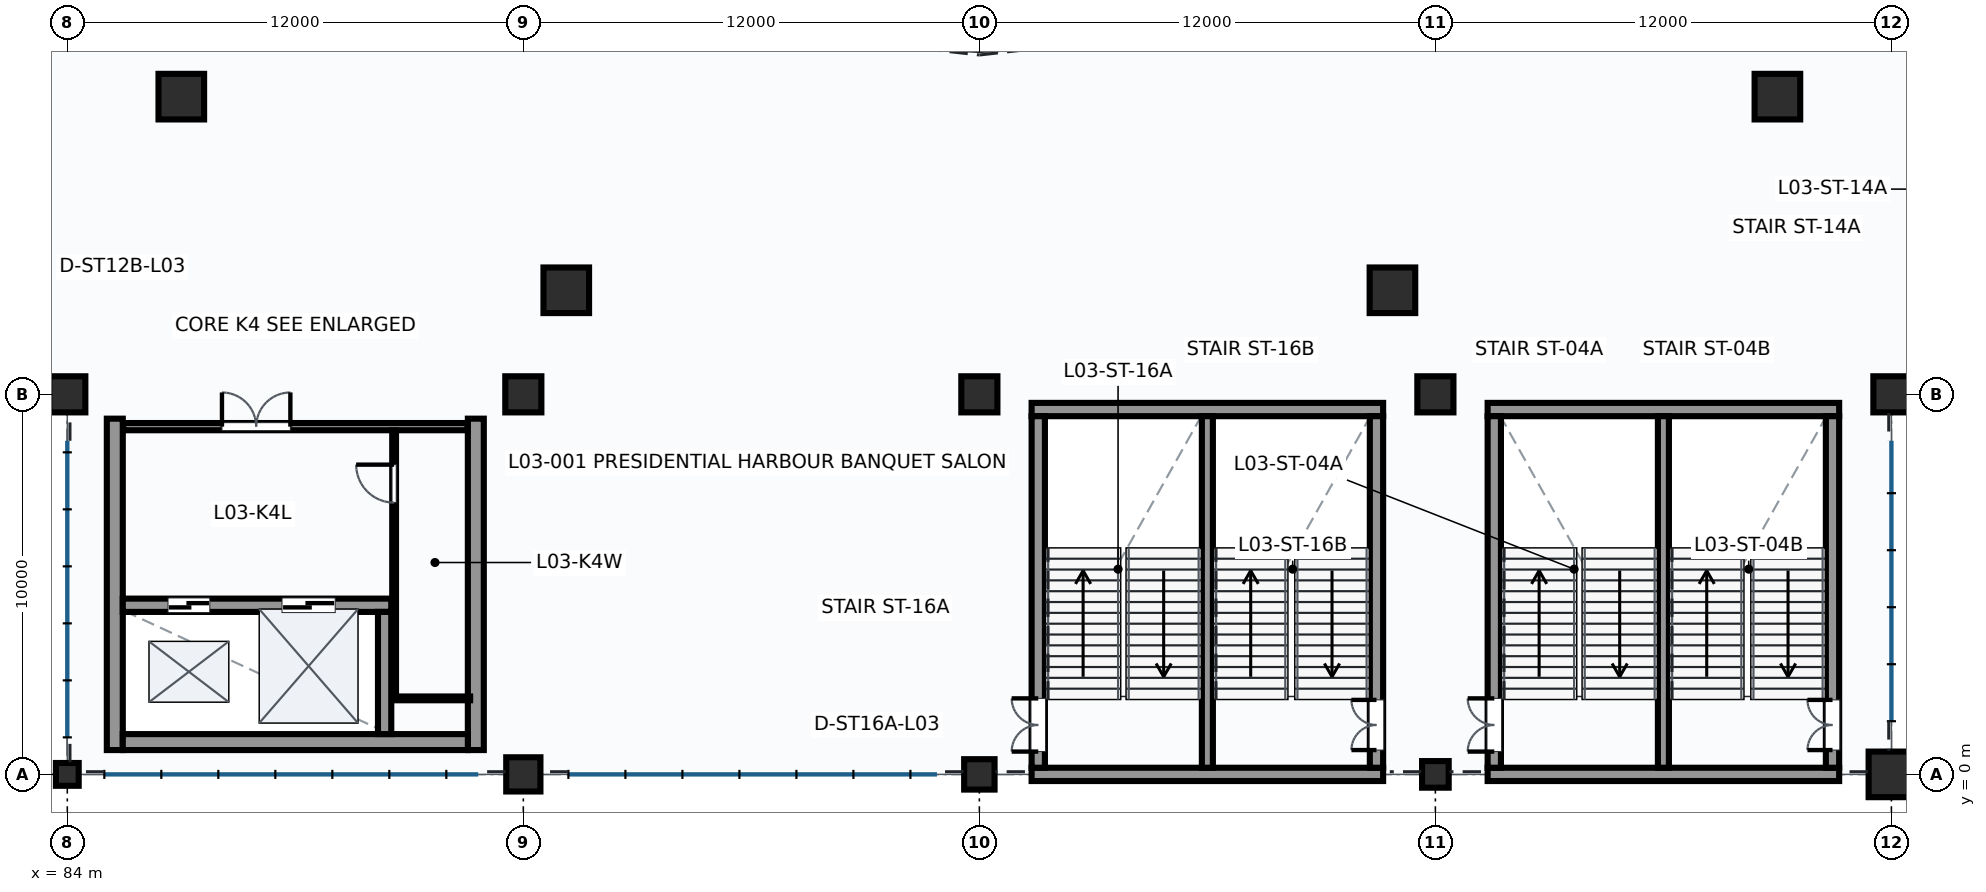
"""IFC4 building model, lengths in metres.
Left out: names, types, materials, properties, quantities, classifications, styles, units other than length and angle.
Written with IfcOpenShell. Run it as: python <this file> out.ifc"""

import sys

from ifc_helpers import new_model, si_unit, direction, frame, frame_2d, origin, origin_2d, place, context, subcontext, project, spatial, rectangle, circle, extrude, element, fill, save


model = new_model("IFC4")
c1 = context("Model", 3, precision=1e-05, world=origin(), true_north=direction((0.0, 1.0)))
c2 = subcontext(c1, "Body", "Model", "MODEL_VIEW")
j1 = project(units=[si_unit("LENGTHUNIT", "METRE"), si_unit("PLANEANGLEUNIT", "RADIAN")], contexts=[c1])
p1 = place(None, origin())
s1 = spatial("IfcSite", under=j1, at=p1, CompositionType="ELEMENT")
p2 = place(p1, origin())
s2 = spatial("IfcBuilding", under=s1, at=p2, CompositionType="ELEMENT")
p3 = place(p2, frame((0.0, 0.0, 14.7)))
s3 = spatial("IfcBuildingStorey", under=s2, at=p3, CompositionType="ELEMENT", Elevation=14.7)
p4 = place(p3, frame((84.0, 0.0, 0.0), z_axis=(0.0, 0.0, 1.0), x_axis=(1.0, 0.0, 0.0)))
e1 = element("IfcColumn", 1, at=p4, inside=s3, PredefinedType="COLUMN", context=c2, shape_type="SweptSolid", body=[
    extrude(rectangle(XDim=0.6, YDim=0.6, at=origin_2d()), origin(), (0.0, 0.0, 1.0), 4.5),
])
p5 = place(p3, frame((84.0, 10.0, 0.0), z_axis=(0.0, 0.0, 1.0), x_axis=(1.0, 0.0, 0.0)))
e2 = element("IfcColumn", 2, at=p5, inside=s3, PredefinedType="COLUMN", context=c2, shape_type="SweptSolid", body=[
    extrude(rectangle(XDim=0.95, YDim=0.95, at=origin_2d()), origin(), (0.0, 0.0, 1.0), 4.5),
])
p6 = place(p3, frame((96.0, 0.0, 0.0), z_axis=(0.0, 0.0, 1.0), x_axis=(1.0, 0.0, 0.0)))
e3 = element("IfcColumn", 3, at=p6, inside=s3, PredefinedType="COLUMN", context=c2, shape_type="SweptSolid", body=[
    extrude(circle(Radius=0.45, at=origin_2d()), origin(), (0.0, 0.0, 1.0), 4.5),
])
p7 = place(p3, frame((96.0, 10.0, 0.0), z_axis=(0.0, 0.0, 1.0), x_axis=(1.0, 0.0, 0.0)))
e4 = element("IfcColumn", 4, at=p7, inside=s3, PredefinedType="COLUMN", context=c2, shape_type="SweptSolid", body=[
    extrude(rectangle(XDim=0.95, YDim=0.95, at=origin_2d()), origin(), (0.0, 0.0, 1.0), 4.5),
])
p8 = place(p3, frame((108.0, 0.0, 0.0), z_axis=(0.0, 0.0, 1.0), x_axis=(1.0, 0.0, 0.0)))
e5 = element("IfcColumn", 5, at=p8, inside=s3, PredefinedType="COLUMN", context=c2, shape_type="SweptSolid", body=[
    extrude(circle(Radius=0.4, at=origin_2d()), origin(), (0.0, 0.0, 1.0), 4.5),
])
p9 = place(p3, frame((108.0, 10.0, 0.0), z_axis=(0.0, 0.0, 1.0), x_axis=(1.0, 0.0, 0.0)))
e6 = element("IfcColumn", 6, at=p9, inside=s3, PredefinedType="COLUMN", context=c2, shape_type="SweptSolid", body=[
    extrude(rectangle(XDim=0.95, YDim=0.95, at=origin_2d()), origin(), (0.0, 0.0, 1.0), 4.5),
])
p10 = place(p3, frame((120.0, 0.0, 0.0), z_axis=(0.0, 0.0, 1.0), x_axis=(1.0, 0.0, 0.0)))
e7 = element("IfcColumn", 7, at=p10, inside=s3, PredefinedType="COLUMN", context=c2, shape_type="SweptSolid", body=[
    extrude(circle(Radius=0.35, at=origin_2d()), origin(), (0.0, 0.0, 1.0), 4.5),
])
p11 = place(p3, frame((120.0, 10.0, 0.0), z_axis=(0.0, 0.0, 1.0), x_axis=(1.0, 0.0, 0.0)))
e8 = element("IfcColumn", 8, at=p11, inside=s3, PredefinedType="COLUMN", context=c2, shape_type="SweptSolid", body=[
    extrude(rectangle(XDim=0.95, YDim=0.95, at=origin_2d()), origin(), (0.0, 0.0, 1.0), 4.5),
])
p12 = place(p3, frame((132.0, 0.0, 0.0), z_axis=(0.0, 0.0, 1.0), x_axis=(1.0, 0.0, 0.0)))
e9 = element("IfcColumn", 9, at=p12, inside=s3, PredefinedType="COLUMN", context=c2, shape_type="SweptSolid", body=[
    extrude(rectangle(XDim=1.2, YDim=1.2, at=origin_2d()), origin(), (0.0, 0.0, 1.0), 4.5),
])
p13 = place(p3, frame((132.0, 10.0, 0.0), z_axis=(0.0, 0.0, 1.0), x_axis=(1.0, 0.0, 0.0)))
e10 = element("IfcColumn", 10, at=p13, inside=s3, PredefinedType="COLUMN", context=c2, shape_type="SweptSolid", body=[
    extrude(rectangle(XDim=0.95, YDim=0.95, at=origin_2d()), origin(), (0.0, 0.0, 1.0), 4.5),
])
for number, where, z_axis, x_axis in (
    (11, (87.0, 17.833, 0.0), (0.0, 0.0, 1.0), (1.0, 0.0, 0.0)),
    (12, (97.13, 12.738, 0.0), (0.0, 0.0, 1.0), (1.0, 0.0, 0.0)),
    (13, (118.87, 12.738, 0.0), (0.0, 0.0, 1.0), (1.0, 0.0, 0.0)),
    (14, (129.0, 17.833, 0.0), (0.0, 0.0, 1.0), (1.0, 0.0, 0.0)),
):
    element("IfcColumn", number, at=place(p3, frame(where, z_axis=z_axis, x_axis=x_axis)), inside=s3, PredefinedType="COLUMN", context=c2, shape_type="SweptSolid", body=[
        extrude(rectangle(XDim=1.2, YDim=1.2, at=origin_2d()), origin(), (0.0, 0.0, 1.0), 4.5),
    ])
p14 = place(p3, frame((121.375, 0.0, 0.0), z_axis=(0.0, 0.0, 1.0), x_axis=(1.0, 0.0, 0.0)))
e15 = element("IfcWall", 15, at=p14, inside=s3, PredefinedType="SHEAR", context=c2, shape_type="SweptSolid", body=[
    extrude(rectangle(XDim=9.25, YDim=0.35, at=frame_2d((4.625, 0.0))), origin(), (0.0, 0.0, 1.0), 3.596),
])
p15 = place(p3, frame((121.375, 9.6, 0.0), z_axis=(0.0, 0.0, 1.0), x_axis=(1.0, 0.0, 0.0)))
e16 = element("IfcWall", 16, at=p15, inside=s3, PredefinedType="SHEAR", context=c2, shape_type="SweptSolid", body=[
    extrude(rectangle(XDim=9.25, YDim=0.35, at=frame_2d((4.625, 0.0))), origin(), (0.0, 0.0, 1.0), 4.5),
])
p16 = place(p3, frame((121.55, 0.175, 0.0), z_axis=(0.0, 0.0, 1.0), x_axis=(0.0, 1.0, 0.0)))
e17 = element("IfcWall", 17, at=p16, inside=s3, PredefinedType="SHEAR", context=c2, shape_type="SweptSolid", body=[
    extrude(rectangle(XDim=9.25, YDim=0.35, at=frame_2d((4.625, 0.0))), origin(), (0.0, 0.0, 1.0), 4.5),
])
p17 = place(p16, frame((0.425, 0.0, 0.0)))
e18 = element("IfcOpeningElement", 18, at=p17, cuts=e17, PredefinedType="OPENING", context=c2, shape_type="SweptSolid", body=[
    extrude(rectangle(XDim=1.4, YDim=2.2, at=frame_2d((0.7, 1.1))), frame((0.0, 0.185, 0.0), z_axis=(0.0, -1.0, 0.0), x_axis=(1.0, 0.0, 0.0)), (0.0, 0.0, 1.0), 0.37),
])
p18 = place(p3, frame((130.45, 0.175, 0.0), z_axis=(0.0, 0.0, 1.0), x_axis=(0.0, 1.0, 0.0)))
e19 = element("IfcWall", 19, at=p18, inside=s3, PredefinedType="SHEAR", context=c2, shape_type="SweptSolid", body=[
    extrude(rectangle(XDim=9.25, YDim=0.35, at=frame_2d((4.625, 0.0))), origin(), (0.0, 0.0, 1.0), 4.5),
])
p19 = place(p18, frame((0.465, 0.0, 0.0)))
e20 = element("IfcOpeningElement", 20, at=p19, cuts=e19, PredefinedType="OPENING", context=c2, shape_type="SweptSolid", body=[
    extrude(rectangle(XDim=1.32, YDim=2.2, at=frame_2d((0.66, 1.1))), frame((0.0, 0.185, 0.0), z_axis=(0.0, -1.0, 0.0), x_axis=(1.0, 0.0, 0.0)), (0.0, 0.0, 1.0), 0.37),
])
p20 = place(p3, frame((126.0, 0.175, 0.0), z_axis=(0.0, 0.0, 1.0), x_axis=(0.0, 1.0, 0.0)))
e21 = element("IfcWall", 21, at=p20, inside=s3, PredefinedType="SHEAR", context=c2, shape_type="SweptSolid", body=[
    extrude(rectangle(XDim=9.25, YDim=0.29, at=frame_2d((4.625, 0.0))), origin(), (0.0, 0.0, 1.0), 4.5),
])
p21 = place(p3, frame((109.375, 0.0, 0.0), z_axis=(0.0, 0.0, 1.0), x_axis=(1.0, 0.0, 0.0)))
e22 = element("IfcWall", 22, at=p21, inside=s3, PredefinedType="SHEAR", context=c2, shape_type="SweptSolid", body=[
    extrude(rectangle(XDim=9.25, YDim=0.35, at=frame_2d((4.625, 0.0))), origin(), (0.0, 0.0, 1.0), 3.447),
])
p22 = place(p3, frame((109.375, 9.6, 0.0), z_axis=(0.0, 0.0, 1.0), x_axis=(1.0, 0.0, 0.0)))
e23 = element("IfcWall", 23, at=p22, inside=s3, PredefinedType="SHEAR", context=c2, shape_type="SweptSolid", body=[
    extrude(rectangle(XDim=9.25, YDim=0.35, at=frame_2d((4.625, 0.0))), origin(), (0.0, 0.0, 1.0), 4.5),
])
p23 = place(p3, frame((109.55, 0.175, 0.0), z_axis=(0.0, 0.0, 1.0), x_axis=(0.0, 1.0, 0.0)))
e24 = element("IfcWall", 24, at=p23, inside=s3, PredefinedType="SHEAR", context=c2, shape_type="SweptSolid", body=[
    extrude(rectangle(XDim=9.25, YDim=0.35, at=frame_2d((4.625, 0.0))), origin(), (0.0, 0.0, 1.0), 4.5),
])
p24 = place(p23, frame((0.425, 0.0, 0.0)))
e25 = element("IfcOpeningElement", 25, at=p24, cuts=e24, PredefinedType="OPENING", context=c2, shape_type="SweptSolid", body=[
    extrude(rectangle(XDim=1.4, YDim=2.2, at=frame_2d((0.7, 1.1))), frame((0.0, 0.185, 0.0), z_axis=(0.0, -1.0, 0.0), x_axis=(1.0, 0.0, 0.0)), (0.0, 0.0, 1.0), 0.37),
])
p25 = place(p3, frame((118.45, 0.175, 0.0), z_axis=(0.0, 0.0, 1.0), x_axis=(0.0, 1.0, 0.0)))
e26 = element("IfcWall", 26, at=p25, inside=s3, PredefinedType="SHEAR", context=c2, shape_type="SweptSolid", body=[
    extrude(rectangle(XDim=9.25, YDim=0.35, at=frame_2d((4.625, 0.0))), origin(), (0.0, 0.0, 1.0), 4.5),
])
p26 = place(p25, frame((0.465, 0.0, 0.0)))
e27 = element("IfcOpeningElement", 27, at=p26, cuts=e26, PredefinedType="OPENING", context=c2, shape_type="SweptSolid", body=[
    extrude(rectangle(XDim=1.32, YDim=2.2, at=frame_2d((0.66, 1.1))), frame((0.0, 0.185, 0.0), z_axis=(0.0, -1.0, 0.0), x_axis=(1.0, 0.0, 0.0)), (0.0, 0.0, 1.0), 0.37),
])
p27 = place(p3, frame((114.0, 0.175, 0.0), z_axis=(0.0, 0.0, 1.0), x_axis=(0.0, 1.0, 0.0)))
e28 = element("IfcWall", 28, at=p27, inside=s3, PredefinedType="SHEAR", context=c2, shape_type="SweptSolid", body=[
    extrude(rectangle(XDim=9.25, YDim=0.29, at=frame_2d((4.625, 0.0))), origin(), (0.0, 0.0, 1.0), 4.5),
])
for number, where, z_axis, x_axis in (
    (29, (85.25, 0.64, 0.0), (0.0, 0.0, 1.0), (0.0, 1.0, 0.0)),
    (30, (94.75, 0.64, 0.0), (0.0, 0.0, 1.0), (0.0, 1.0, 0.0)),
):
    element("IfcWall", number, at=place(p3, frame(where, z_axis=z_axis, x_axis=x_axis)), inside=s3, PredefinedType="SHEAR", context=c2, shape_type="SweptSolid", body=[
        extrude(rectangle(XDim=8.72, YDim=0.42, at=frame_2d((4.36, 0.0))), origin(), (0.0, 0.0, 1.0), 4.5),
    ])
p28 = place(p3, frame((85.46, 0.85, 0.0), z_axis=(0.0, 0.0, 1.0), x_axis=(1.0, 0.0, 0.0)))
e31 = element("IfcWall", 31, at=p28, inside=s3, PredefinedType="SHEAR", context=c2, shape_type="SweptSolid", body=[
    extrude(rectangle(XDim=9.08, YDim=0.42, at=frame_2d((4.54, 0.0))), origin(), (0.0, 0.0, 1.0), 4.5),
])
p29 = place(p3, frame((85.46, 4.45, 0.0), z_axis=(0.0, 0.0, 1.0), x_axis=(1.0, 0.0, 0.0)))
e32 = element("IfcWall", 32, at=p29, inside=s3, PredefinedType="SHEAR", context=c2, shape_type="SweptSolid", body=[
    extrude(rectangle(XDim=7.065, YDim=0.35, at=frame_2d((3.532, 0.0))), origin(), (0.0, 0.0, 1.0), 4.5),
])
p30 = place(p29, frame((1.19, 0.0, 0.0)))
e33 = element("IfcOpeningElement", 33, at=p30, cuts=e32, PredefinedType="OPENING", context=c2, shape_type="SweptSolid", body=[
    extrude(rectangle(XDim=1.1, YDim=2.2, at=frame_2d((0.55, 1.1))), frame((0.0, 0.185, 0.0), z_axis=(0.0, -1.0, 0.0), x_axis=(1.0, 0.0, 0.0)), (0.0, 0.0, 1.0), 0.37),
])
p31 = place(p29, frame((4.19, 0.0, 0.0)))
e34 = element("IfcOpeningElement", 34, at=p31, cuts=e32, PredefinedType="OPENING", context=c2, shape_type="SweptSolid", body=[
    extrude(rectangle(XDim=1.4, YDim=2.3, at=frame_2d((0.7, 1.15))), frame((0.0, 0.185, 0.0), z_axis=(0.0, -1.0, 0.0), x_axis=(1.0, 0.0, 0.0)), (0.0, 0.0, 1.0), 0.37),
])
p32 = place(p3, frame((92.35, 1.06, 0.0), z_axis=(0.0, 0.0, 1.0), x_axis=(0.0, 1.0, 0.0)))
e35 = element("IfcWall", 35, at=p32, inside=s3, PredefinedType="SHEAR", context=c2, shape_type="SweptSolid", body=[
    extrude(rectangle(XDim=3.215, YDim=0.35, at=frame_2d((1.607, 0.0))), origin(), (0.0, 0.0, 1.0), 4.5),
])
p33 = place(p3, frame((85.47, 9.15, 0.0), z_axis=(0.0, 0.0, 1.0), x_axis=(1.0, 0.0, 0.0)))
e36 = element("IfcWall", 36, at=p33, inside=s3, PredefinedType="PARTITIONING", context=c2, shape_type="SweptSolid", body=[
    extrude(rectangle(XDim=9.06, YDim=0.19, at=frame_2d((4.53, 0.0))), origin(), (0.0, 0.0, 1.0), 4.16),
])
p34 = place(p33, frame((2.6, 0.0, 0.0)))
e37 = element("IfcOpeningElement", 37, at=p34, cuts=e36, PredefinedType="OPENING", context=c2, shape_type="SweptSolid", body=[
    extrude(rectangle(XDim=1.8, YDim=2.3, at=frame_2d((0.9, 1.15))), frame((0.0, 0.105, 0.0), z_axis=(0.0, -1.0, 0.0), x_axis=(1.0, 0.0, 0.0)), (0.0, 0.0, 1.0), 0.21),
])
p35 = place(p3, frame((92.6, 2.0, 0.0), z_axis=(0.0, 0.0, 1.0), x_axis=(0.0, 1.0, 0.0)))
e38 = element("IfcWall", 38, at=p35, inside=s3, PredefinedType="PARTITIONING", context=c2, shape_type="SweptSolid", body=[
    extrude(rectangle(XDim=7.05, YDim=0.1, at=frame_2d((3.525, 0.0))), origin(), (0.0, 0.0, 1.0), 4.16),
])
p36 = place(p35, frame((5.15, 0.0, 0.0)))
e39 = element("IfcOpeningElement", 39, at=p36, cuts=e38, PredefinedType="OPENING", context=c2, shape_type="SweptSolid", body=[
    extrude(rectangle(XDim=1.0, YDim=2.1, at=frame_2d((0.5, 1.05))), frame((0.0, 0.06, 0.0), z_axis=(0.0, -1.0, 0.0), x_axis=(1.0, 0.0, 0.0)), (0.0, 0.0, 1.0), 0.12),
])
p37 = place(p3, frame((92.6, 2.0, 0.0), z_axis=(0.0, 0.0, 1.0), x_axis=(1.0, 0.0, 0.0)))
e40 = element("IfcWall", 40, at=p37, inside=s3, PredefinedType="PARTITIONING", context=c2, shape_type="SweptSolid", body=[
    extrude(rectangle(XDim=2.0, YDim=0.1, at=frame_2d((1.0, 0.0))), origin(), (0.0, 0.0, 1.0), 4.16),
])
p38 = place(p17, frame((1.4, 0.0, 0.0), z_axis=(0.0, 0.0, 1.0), x_axis=(-1.0, 0.0, 0.0)))
e41 = element("IfcDoor", 41, at=p38, inside=s3, OperationType="DOUBLE_DOOR_SINGLE_SWING", PredefinedType="DOOR", context=c2, shape_type="SweptSolid", body=[
    extrude(rectangle(XDim=1.4, YDim=2.2, at=frame_2d((0.7, 1.1))), frame((0.0, 0.025, 0.0), z_axis=(0.0, -1.0, 0.0), x_axis=(1.0, 0.0, 0.0)), (0.0, 0.0, 1.0), 0.05),
])
fill(e18, e41)
p39 = place(p19, origin())
e42 = element("IfcDoor", 42, at=p39, inside=s3, OperationType="DOUBLE_DOOR_SINGLE_SWING", PredefinedType="DOOR", context=c2, shape_type="SweptSolid", body=[
    extrude(rectangle(XDim=1.32, YDim=2.2, at=frame_2d((0.66, 1.1))), frame((0.0, 0.025, 0.0), z_axis=(0.0, -1.0, 0.0), x_axis=(1.0, 0.0, 0.0)), (0.0, 0.0, 1.0), 0.05),
])
fill(e20, e42)
p40 = place(p24, frame((1.4, 0.0, 0.0), z_axis=(0.0, 0.0, 1.0), x_axis=(-1.0, 0.0, 0.0)))
e43 = element("IfcDoor", 43, at=p40, inside=s3, OperationType="DOUBLE_DOOR_SINGLE_SWING", PredefinedType="DOOR", context=c2, shape_type="SweptSolid", body=[
    extrude(rectangle(XDim=1.4, YDim=2.2, at=frame_2d((0.7, 1.1))), frame((0.0, 0.025, 0.0), z_axis=(0.0, -1.0, 0.0), x_axis=(1.0, 0.0, 0.0)), (0.0, 0.0, 1.0), 0.05),
])
fill(e25, e43)
p41 = place(p26, origin())
e44 = element("IfcDoor", 44, at=p41, inside=s3, OperationType="DOUBLE_DOOR_SINGLE_SWING", PredefinedType="DOOR", context=c2, shape_type="SweptSolid", body=[
    extrude(rectangle(XDim=1.32, YDim=2.2, at=frame_2d((0.66, 1.1))), frame((0.0, 0.025, 0.0), z_axis=(0.0, -1.0, 0.0), x_axis=(1.0, 0.0, 0.0)), (0.0, 0.0, 1.0), 0.05),
])
fill(e27, e44)
p42 = place(p30, origin())
e45 = element("IfcDoor", 45, at=p42, inside=s3, OperationType="SLIDING_TO_LEFT", PredefinedType="DOOR", context=c2, shape_type="SweptSolid", body=[
    extrude(rectangle(XDim=1.1, YDim=2.2, at=frame_2d((0.55, 1.1))), frame((0.0, 0.025, 0.0), z_axis=(0.0, -1.0, 0.0), x_axis=(1.0, 0.0, 0.0)), (0.0, 0.0, 1.0), 0.05),
])
fill(e33, e45)
p43 = place(p31, origin())
e46 = element("IfcDoor", 46, at=p43, inside=s3, OperationType="SLIDING_TO_LEFT", PredefinedType="DOOR", context=c2, shape_type="SweptSolid", body=[
    extrude(rectangle(XDim=1.4, YDim=2.3, at=frame_2d((0.7, 1.15))), frame((0.0, 0.025, 0.0), z_axis=(0.0, -1.0, 0.0), x_axis=(1.0, 0.0, 0.0)), (0.0, 0.0, 1.0), 0.05),
])
fill(e34, e46)
p44 = place(p34, origin())
e47 = element("IfcDoor", 47, at=p44, inside=s3, OperationType="DOUBLE_DOOR_SINGLE_SWING", PredefinedType="DOOR", context=c2, shape_type="SweptSolid", body=[
    extrude(rectangle(XDim=1.8, YDim=2.3, at=frame_2d((0.9, 1.15))), frame((0.0, 0.025, 0.0), z_axis=(0.0, -1.0, 0.0), x_axis=(1.0, 0.0, 0.0)), (0.0, 0.0, 1.0), 0.05),
])
fill(e37, e47)
p45 = place(p36, origin())
e48 = element("IfcDoor", 48, at=p45, inside=s3, OperationType="SINGLE_SWING_RIGHT", PredefinedType="DOOR", context=c2, shape_type="SweptSolid", body=[
    extrude(rectangle(XDim=1.0, YDim=2.1, at=frame_2d((0.5, 1.05))), frame((0.0, 0.025, 0.0), z_axis=(0.0, -1.0, 0.0), x_axis=(1.0, 0.0, 0.0)), (0.0, 0.0, 1.0), 0.05),
])
fill(e39, e48)
save(model, sys.argv[1])
